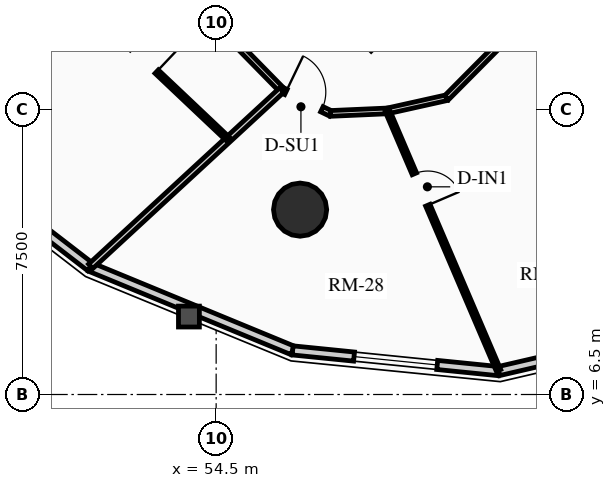
"""IFC4 building model, lengths in metres.
Left out: names, types, materials, properties, quantities, classifications, styles, units other than length and angle.
Written with IfcOpenShell. Run it as: python <this file> out.ifc"""

import sys

from ifc_helpers import new_model, si_unit, direction, frame, frame_2d, origin, origin_2d, place, context, subcontext, project, spatial, rectangle, circle, extrude, source, transform, mapped, element, fill, save


model = new_model("IFC4")
c1 = context("Model", 3, precision=1e-05, world=origin(), true_north=direction((0.0, 1.0)))
c2 = subcontext(c1, "Body", "Model", "MODEL_VIEW")
j1 = project(units=[si_unit("LENGTHUNIT", "METRE"), si_unit("PLANEANGLEUNIT", "RADIAN")], contexts=[c1])
p1 = place(None, origin())
s1 = spatial("IfcSite", under=j1, at=p1, CompositionType="ELEMENT")
p2 = place(p1, origin())
s2 = spatial("IfcBuilding", under=s1, at=p2, CompositionType="ELEMENT")
p3 = place(p2, frame((0.0, 0.0, 113.8)))
s3 = spatial("IfcBuildingStorey", under=s2, at=p3, CompositionType="ELEMENT", Elevation=113.8)
p4 = place(p3, frame((56.709, 11.365, 0.0), z_axis=(0.0, 0.0, 1.0), x_axis=(1.0, 0.0, 0.0)))
e1 = element("IfcColumn", 1, at=p4, inside=s3, PredefinedType="USERDEFINED", context=c2, shape_type="SweptSolid", body=[
    extrude(circle(Radius=0.7, at=origin_2d()), origin(), (0.0, 0.0, 1.0), 2.91),
])
p5 = place(p3, frame((51.189, 9.855, 0.0), z_axis=(0.0, 0.0, 1.0), x_axis=(-0.791982052206, 0.61054437102, 0.0)))
e2 = element("IfcWall", 2, at=p5, inside=s3, PredefinedType="SOLIDWALL", context=c2, shape_type="SweptSolid", body=[
    extrude(rectangle(XDim=5.942, YDim=0.24, at=frame_2d((2.971, 0.0))), origin(), (0.0, 0.0, 1.0), 2.179),
])
m1 = source(origin(), c2, "Body", "SweptSolid", [
    extrude(rectangle(XDim=1.9, YDim=1.35, at=frame_2d((0.95, 0.675))), frame((0.0, 0.13, 0.0), z_axis=(0.0, -1.0, 0.0), x_axis=(1.0, 0.0, 0.0)), (0.0, 0.0, 1.0), 0.26),
])
p6 = place(p5, frame((2.021, 0.0, 0.65)))
e3 = element("IfcOpeningElement", 3, at=p6, cuts=e2, PredefinedType="OPENING", context=c2, shape_type="MappedRepresentation", body=[
    mapped(m1, transform((0.0, 0.0, 0.0), x_axis=(1.0, 0.0, 0.0), y_axis=(0.0, 1.0, 0.0), z_axis=(0.0, 0.0, 1.0), scale=1.0)),
])
p7 = place(p3, frame((56.513, 7.661, 0.0), z_axis=(0.0, 0.0, 1.0), x_axis=(-0.924563909604, 0.381027003055, 0.0)))
e4 = element("IfcWall", 4, at=p7, inside=s3, PredefinedType="SOLIDWALL", context=c2, shape_type="SweptSolid", body=[
    extrude(rectangle(XDim=5.758, YDim=0.24, at=frame_2d((2.879, 0.0))), origin(), (0.0, 0.0, 1.0), 2.179),
])
p8 = place(p3, frame((61.933, 7.115, 0.0), z_axis=(0.0, 0.0, 1.0), x_axis=(-0.994971754311, 0.10015591906, 0.0)))
e5 = element("IfcWall", 5, at=p8, inside=s3, PredefinedType="SOLIDWALL", context=c2, shape_type="SweptSolid", body=[
    extrude(rectangle(XDim=5.448, YDim=0.24, at=frame_2d((2.724, 0.0))), origin(), (0.0, 0.0, 1.0), 2.179),
])
m2 = source(origin(), c2, "Body", "SweptSolid", [
    extrude(rectangle(XDim=2.2, YDim=1.35, at=frame_2d((1.1, 0.675))), frame((0.0, 0.13, 0.0), z_axis=(0.0, -1.0, 0.0), x_axis=(1.0, 0.0, 0.0)), (0.0, 0.0, 1.0), 0.26),
])
p9 = place(p8, frame((1.624, 0.0, 0.65)))
e6 = element("IfcOpeningElement", 6, at=p9, cuts=e5, PredefinedType="OPENING", context=c2, shape_type="MappedRepresentation", body=[
    mapped(m2, transform((0.0, 0.0, 0.0), x_axis=(1.0, 0.0, 0.0), y_axis=(0.0, 1.0, 0.0), z_axis=(0.0, 0.0, 1.0), scale=1.0)),
])
p10 = place(p3, frame((66.92, 8.271, 0.0), z_axis=(0.0, 0.0, 1.0), x_axis=(-0.974165631126, -0.225834725257, 0.0)))
e7 = element("IfcWall", 7, at=p10, inside=s3, PredefinedType="SOLIDWALL", context=c2, shape_type="SweptSolid", body=[
    extrude(rectangle(XDim=5.119, YDim=0.24, at=frame_2d((2.56, 0.0))), origin(), (0.0, 0.0, 1.0), 2.179),
])
p11 = place(p10, frame((1.609, 0.0, 0.65)))
e8 = element("IfcOpeningElement", 8, at=p11, cuts=e7, PredefinedType="OPENING", context=c2, shape_type="MappedRepresentation", body=[
    mapped(m1, transform((0.0, 0.0, 0.0), x_axis=(1.0, 0.0, 0.0), y_axis=(0.0, 1.0, 0.0), z_axis=(0.0, 0.0, 1.0), scale=1.0)),
])
p12 = place(p3, frame((51.914, 18.914, 0.0), z_axis=(0.0, 0.0, 1.0), x_axis=(0.699999313799, -0.714143515465, 0.0)))
e9 = element("IfcWall", 9, at=p12, inside=s3, PredefinedType="PARTITIONING", context=c2, shape_type="SweptSolid", body=[
    extrude(rectangle(XDim=6.162, YDim=0.15, at=frame_2d((3.081, 0.0))), origin(), (0.0, 0.0, 1.0), 2.225),
])
p13 = place(p3, frame((56.227, 14.513, 0.0), z_axis=(0.0, 0.0, 1.0), x_axis=(0.901477579283, -0.432825801044, 0.0)))
e10 = element("IfcWall", 10, at=p13, inside=s3, PredefinedType="PARTITIONING", context=c2, shape_type="SweptSolid", body=[
    extrude(rectangle(XDim=1.424, YDim=0.15, at=frame_2d((0.712, 0.0))), origin(), (0.0, 0.0, 1.0), 2.225),
])
m3 = source(origin(), c2, "Body", "SweptSolid", [
    extrude(rectangle(XDim=1.05, YDim=2.015, at=frame_2d((0.525, 1.007))), frame((0.0, 0.085, 0.0), z_axis=(0.0, -1.0, 0.0), x_axis=(1.0, 0.0, 0.0)), (0.0, 0.0, 1.0), 0.17),
])
p14 = place(p13, frame((0.12, 0.0, 0.0)))
e11 = element("IfcOpeningElement", 11, at=p14, cuts=e10, PredefinedType="OPENING", context=c2, shape_type="MappedRepresentation", body=[
    mapped(m3, transform((0.0, 0.0, 0.0), x_axis=(1.0, 0.0, 0.0), y_axis=(0.0, 1.0, 0.0), z_axis=(0.0, 0.0, 1.0), scale=1.0)),
])
p15 = place(p3, frame((57.511, 13.897, 0.0), z_axis=(0.0, 0.0, 1.0), x_axis=(0.999024538494, 0.044158481476, 0.0)))
e12 = element("IfcWall", 12, at=p15, inside=s3, PredefinedType="PARTITIONING", context=c2, shape_type="SweptSolid", body=[
    extrude(rectangle(XDim=1.498, YDim=0.15, at=frame_2d((0.749, 0.0))), origin(), (0.0, 0.0, 1.0), 2.225),
])
p16 = place(p3, frame((59.008, 13.963, 0.0), z_axis=(0.0, 0.0, 1.0), x_axis=(0.976020856791, 0.21767702476, 0.0)))
e13 = element("IfcWall", 13, at=p16, inside=s3, PredefinedType="PARTITIONING", context=c2, shape_type="SweptSolid", body=[
    extrude(rectangle(XDim=1.593, YDim=0.15, at=frame_2d((0.796, 0.0))), origin(), (0.0, 0.0, 1.0), 2.225),
])
p17 = place(p3, frame((60.562, 14.31, 0.0), z_axis=(0.0, 0.0, 1.0), x_axis=(0.704566236161, 0.709638230975, 0.0)))
e14 = element("IfcWall", 14, at=p17, inside=s3, PredefinedType="PARTITIONING", context=c2, shape_type="SweptSolid", body=[
    extrude(rectangle(XDim=3.321, YDim=0.15, at=frame_2d((1.661, 0.0))), origin(), (0.0, 0.0, 1.0), 2.225),
])
p18 = place(p3, frame((56.227, 14.513, 0.0), z_axis=(0.0, 0.0, 1.0), x_axis=(-0.734951144322, -0.678120059768, 0.0)))
e15 = element("IfcWall", 15, at=p18, inside=s3, PredefinedType="PARTITIONING", context=c2, shape_type="SweptSolid", body=[
    extrude(rectangle(XDim=6.843, YDim=0.16, at=frame_2d((3.422, 0.0))), origin(), (0.0, 0.0, 1.0), 2.179),
])
p19 = place(p3, frame((62.903, 16.667, 0.0), z_axis=(0.0, 0.0, 1.0), x_axis=(0.819735047612, -0.572742919395, 0.0)))
e16 = element("IfcWall", 16, at=p19, inside=s3, PredefinedType="PARTITIONING", context=c2, shape_type="SweptSolid", body=[
    extrude(rectangle(XDim=9.842, YDim=0.16, at=frame_2d((4.921, 0.0))), origin(), (0.0, 0.0, 1.0), 2.179),
])
p20 = place(p3, frame((50.397, 17.397, 0.0), z_axis=(0.0, 0.0, 1.0), x_axis=(0.726427828833, -0.687242758781, 0.0)))
e17 = element("IfcWall", 17, at=p20, inside=s3, PredefinedType="PARTITIONING", context=c2, shape_type="SweptSolid", body=[
    extrude(rectangle(XDim=6.087, YDim=0.125, at=frame_2d((3.043, 0.0))), origin(), (0.0, 0.0, 1.0), 2.225),
])
m4 = source(origin(), c2, "Body", "SweptSolid", [
    extrude(rectangle(XDim=0.9, YDim=2.005, at=frame_2d((0.45, 1.002))), frame((0.0, 0.073, 0.0), z_axis=(0.0, -1.0, 0.0), x_axis=(1.0, 0.0, 0.0)), (0.0, 0.0, 1.0), 0.145),
])
p21 = place(p20, frame((2.594, 0.0, 0.0)))
e18 = element("IfcOpeningElement", 18, at=p21, cuts=e17, PredefinedType="OPENING", context=c2, shape_type="MappedRepresentation", body=[
    mapped(m4, transform((0.0, 0.0, 0.0), x_axis=(1.0, 0.0, 0.0), y_axis=(0.0, 1.0, 0.0), z_axis=(0.0, 0.0, 1.0), scale=1.0)),
])
p22 = place(p3, frame((59.008, 13.963, 0.0), z_axis=(0.0, 0.0, 1.0), x_axis=(0.393439207333, -0.919350635032, 0.0)))
e19 = element("IfcWall", 19, at=p22, inside=s3, PredefinedType="PARTITIONING", context=c2, shape_type="SweptSolid", body=[
    extrude(rectangle(XDim=7.427, YDim=0.125, at=frame_2d((3.713, 0.0))), origin(), (0.0, 0.0, 1.0), 2.179),
])
p23 = place(p22, frame((1.8, 0.0, 0.0)))
e20 = element("IfcOpeningElement", 20, at=p23, cuts=e19, PredefinedType="OPENING", context=c2, shape_type="MappedRepresentation", body=[
    mapped(m4, transform((0.0, 0.0, 0.0), x_axis=(1.0, 0.0, 0.0), y_axis=(0.0, 1.0, 0.0), z_axis=(0.0, 0.0, 1.0), scale=1.0)),
])
m5 = source(origin(), c2, "Body", "SweptSolid", [
    extrude(rectangle(XDim=2.2, YDim=1.35, at=frame_2d((1.1, 0.675))), frame((0.0, 0.03, 0.0), z_axis=(0.0, -1.0, 0.0), x_axis=(1.0, 0.0, 0.0)), (0.0, 0.0, 1.0), 0.06),
])
p24 = place(p9, origin())
e21 = element("IfcWindow", 21, at=p24, inside=s3, PartitioningType="DOUBLE_PANEL_VERTICAL", PredefinedType="WINDOW", context=c2, shape_type="MappedRepresentation", body=[
    mapped(m5, transform((0.0, 0.0, 0.0), x_axis=(1.0, 0.0, 0.0), y_axis=(0.0, 1.0, 0.0), z_axis=(0.0, 0.0, 1.0), scale=1.0)),
])
fill(e6, e21)
m6 = source(origin(), c2, "Body", "SweptSolid", [
    extrude(rectangle(XDim=0.9, YDim=2.005, at=frame_2d((0.45, 1.002))), frame((0.0, 0.025, 0.0), z_axis=(0.0, -1.0, 0.0), x_axis=(1.0, 0.0, 0.0)), (0.0, 0.0, 1.0), 0.05),
])
p25 = place(p21, origin())
e22 = element("IfcDoor", 22, at=p25, inside=s3, OperationType="SINGLE_SWING_RIGHT", PredefinedType="DOOR", context=c2, shape_type="MappedRepresentation", body=[
    mapped(m6, transform((0.0, 0.0, 0.0), x_axis=(1.0, 0.0, 0.0), y_axis=(0.0, 1.0, 0.0), z_axis=(0.0, 0.0, 1.0), scale=1.0)),
])
fill(e18, e22)
m7 = source(origin(), c2, "Body", "SweptSolid", [
    extrude(rectangle(XDim=1.05, YDim=2.015, at=frame_2d((0.525, 1.007))), frame((0.0, 0.025, 0.0), z_axis=(0.0, -1.0, 0.0), x_axis=(1.0, 0.0, 0.0)), (0.0, 0.0, 1.0), 0.05),
])
p26 = place(p14, origin())
e23 = element("IfcDoor", 23, at=p26, inside=s3, OperationType="SINGLE_SWING_LEFT", PredefinedType="DOOR", context=c2, shape_type="MappedRepresentation", body=[
    mapped(m7, transform((0.0, 0.0, 0.0), x_axis=(1.0, 0.0, 0.0), y_axis=(0.0, 1.0, 0.0), z_axis=(0.0, 0.0, 1.0), scale=1.0)),
])
fill(e11, e23)
p27 = place(p23, origin())
e24 = element("IfcDoor", 24, at=p27, inside=s3, OperationType="SINGLE_SWING_RIGHT", PredefinedType="DOOR", context=c2, shape_type="MappedRepresentation", body=[
    mapped(m6, transform((0.0, 0.0, 0.0), x_axis=(1.0, 0.0, 0.0), y_axis=(0.0, 1.0, 0.0), z_axis=(0.0, 0.0, 1.0), scale=1.0)),
])
fill(e20, e24)
save(model, sys.argv[1])
